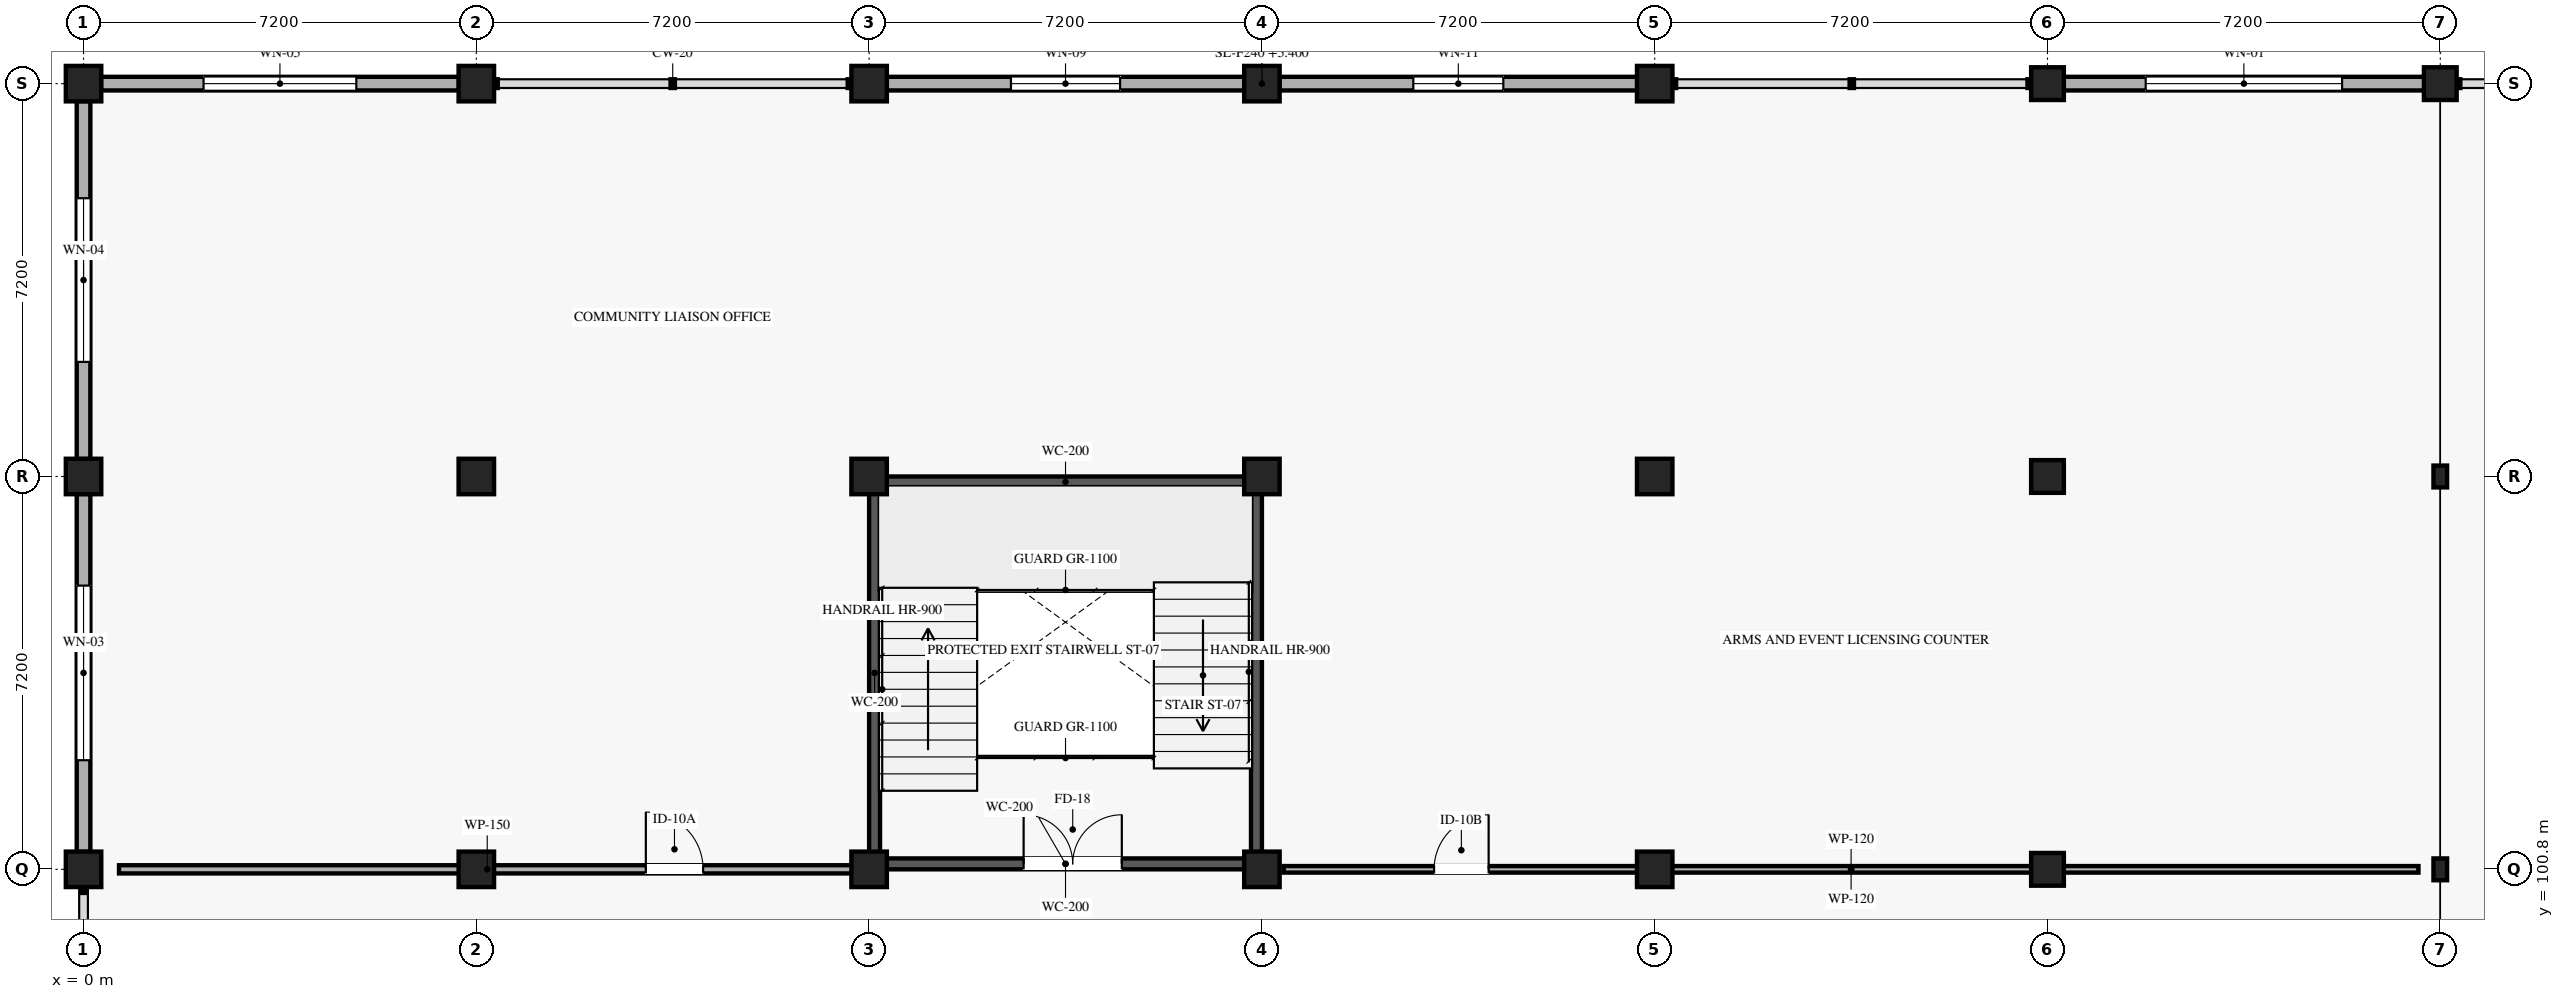
"""IFC4 building model, lengths in metres.
Left out: names, types, materials, properties, quantities, classifications, styles, units other than length and angle.
Written with IfcOpenShell. Run it as: python <this file> out.ifc"""

import sys

from ifc_helpers import new_model, si_unit, direction, frame, frame_2d, origin, origin_2d, place, context, subcontext, project, spatial, rectangle, i_section, extrude, element, fill, save


model = new_model("IFC4")
c1 = context("Model", 3, precision=1e-05, world=origin(), true_north=direction((0.0, 1.0)))
c2 = subcontext(c1, "Body", "Model", "MODEL_VIEW")
j1 = project(units=[si_unit("LENGTHUNIT", "METRE"), si_unit("PLANEANGLEUNIT", "RADIAN")], contexts=[c1])
p1 = place(None, origin())
s1 = spatial("IfcSite", under=j1, at=p1, CompositionType="ELEMENT")
p2 = place(p1, origin())
s2 = spatial("IfcBuilding", under=s1, at=p2, CompositionType="ELEMENT")
p3 = place(p2, frame((0.0, 0.0, 5.4)))
s3 = spatial("IfcBuildingStorey", under=s2, at=p3, CompositionType="ELEMENT", Elevation=5.4)
for number, where, z_axis, x_axis in (
    (1, (0.0, 100.8, 0.0), (0.0, 0.0, 1.0), (1.0, 0.0, 0.0)),
    (2, (0.0, 108.0, 0.0), (0.0, 0.0, 1.0), (1.0, 0.0, 0.0)),
    (3, (0.0, 115.2, 0.0), (0.0, 0.0, 1.0), (1.0, 0.0, 0.0)),
    (4, (7.2, 100.8, 0.0), (0.0, 0.0, 1.0), (1.0, 0.0, 0.0)),
    (5, (7.2, 108.0, 0.0), (0.0, 0.0, 1.0), (1.0, 0.0, 0.0)),
    (6, (7.2, 115.2, 0.0), (0.0, 0.0, 1.0), (1.0, 0.0, 0.0)),
    (7, (14.4, 100.8, 0.0), (0.0, 0.0, 1.0), (1.0, 0.0, 0.0)),
    (8, (14.4, 108.0, 0.0), (0.0, 0.0, 1.0), (1.0, 0.0, 0.0)),
    (9, (14.4, 115.2, 0.0), (0.0, 0.0, 1.0), (1.0, 0.0, 0.0)),
    (10, (21.6, 100.8, 0.0), (0.0, 0.0, 1.0), (1.0, 0.0, 0.0)),
    (11, (21.6, 108.0, 0.0), (0.0, 0.0, 1.0), (1.0, 0.0, 0.0)),
    (12, (21.6, 115.2, 0.0), (0.0, 0.0, 1.0), (1.0, 0.0, 0.0)),
    (13, (28.8, 100.8, 0.0), (0.0, 0.0, 1.0), (1.0, 0.0, 0.0)),
    (14, (28.8, 108.0, 0.0), (0.0, 0.0, 1.0), (1.0, 0.0, 0.0)),
    (15, (28.8, 115.2, 0.0), (0.0, 0.0, 1.0), (1.0, 0.0, 0.0)),
):
    element("IfcColumn", number, at=place(p3, frame(where, z_axis=z_axis, x_axis=x_axis)), inside=s3, PredefinedType="COLUMN", context=c2, shape_type="SweptSolid", body=[
        extrude(rectangle(XDim=0.65, YDim=0.65, at=origin_2d()), origin(), (0.0, 0.0, 1.0), 4.05),
    ])
for number, where, z_axis, x_axis in (
    (16, (36.0, 100.8, 0.0), (0.0, 0.0, 1.0), (1.0, 0.0, 0.0)),
    (17, (36.0, 108.0, 0.0), (0.0, 0.0, 1.0), (1.0, 0.0, 0.0)),
    (18, (36.0, 115.2, 0.0), (0.0, 0.0, 1.0), (1.0, 0.0, 0.0)),
):
    element("IfcColumn", number, at=place(p3, frame(where, z_axis=z_axis, x_axis=x_axis)), inside=s3, PredefinedType="COLUMN", context=c2, shape_type="SweptSolid", body=[
        extrude(rectangle(XDim=0.6, YDim=0.6, at=origin_2d()), origin(), (0.0, 0.0, 1.0), 4.05),
    ])
for number, where, z_axis, x_axis in (
    (19, (43.2, 100.8, 0.0), (0.0, 0.0, 1.0), (1.0, 0.0, 0.0)),
    (20, (43.2, 108.0, 0.0), (0.0, 0.0, 1.0), (1.0, 0.0, 0.0)),
):
    element("IfcColumn", number, at=place(p3, frame(where, z_axis=z_axis, x_axis=x_axis)), inside=s3, PredefinedType="COLUMN", context=c2, shape_type="SweptSolid", body=[
        extrude(i_section(OverallWidth=0.25, OverallDepth=0.4, WebThickness=0.01, FlangeThickness=0.013, at=origin_2d()), origin(), (0.0, 0.0, 1.0), 4.05),
    ])
p4 = place(p3, frame((43.2, 115.2, 0.0), z_axis=(0.0, 0.0, 1.0), x_axis=(1.0, 0.0, 0.0)))
e21 = element("IfcColumn", 21, at=p4, inside=s3, PredefinedType="COLUMN", context=c2, shape_type="SweptSolid", body=[
    extrude(rectangle(XDim=0.6, YDim=0.6, at=origin_2d()), origin(), (0.0, 0.0, 1.0), 4.05),
])
p5 = place(p3, frame((0.32, 115.2, 0.0), z_axis=(0.0, 0.0, 1.0), x_axis=(1.0, 0.0, 0.0)))
e22 = element("IfcWall", 22, at=p5, inside=s3, PredefinedType="SOLIDWALL", context=c2, shape_type="SweptSolid", body=[
    extrude(rectangle(XDim=6.56, YDim=0.25, at=frame_2d((3.28, 0.0))), origin(), (0.0, 0.0, 1.0), 3.195),
])
p6 = place(p5, frame((1.88, 0.0, 0.85)))
e23 = element("IfcOpeningElement", 23, at=p6, cuts=e22, PredefinedType="OPENING", context=c2, shape_type="SweptSolid", body=[
    extrude(rectangle(XDim=2.8, YDim=1.85, at=frame_2d((1.4, 0.925))), frame((0.0, 0.135, 0.0), z_axis=(0.0, -1.0, 0.0), x_axis=(1.0, 0.0, 0.0)), (0.0, 0.0, 1.0), 0.27),
])
p7 = place(p3, frame((14.72, 115.2, 0.0), z_axis=(0.0, 0.0, 1.0), x_axis=(1.0, 0.0, 0.0)))
e24 = element("IfcWall", 24, at=p7, inside=s3, PredefinedType="SOLIDWALL", context=c2, shape_type="SweptSolid", body=[
    extrude(rectangle(XDim=6.56, YDim=0.25, at=frame_2d((3.28, 0.0))), origin(), (0.0, 0.0, 1.0), 3.195),
])
p8 = place(p7, frame((2.28, 0.0, 0.85)))
e25 = element("IfcOpeningElement", 25, at=p8, cuts=e24, PredefinedType="OPENING", context=c2, shape_type="SweptSolid", body=[
    extrude(rectangle(XDim=2.0, YDim=1.65, at=frame_2d((1.0, 0.825))), frame((0.0, 0.135, 0.0), z_axis=(0.0, -1.0, 0.0), x_axis=(1.0, 0.0, 0.0)), (0.0, 0.0, 1.0), 0.27),
])
p9 = place(p3, frame((21.92, 115.2, 0.0), z_axis=(0.0, 0.0, 1.0), x_axis=(1.0, 0.0, 0.0)))
e26 = element("IfcWall", 26, at=p9, inside=s3, PredefinedType="SOLIDWALL", context=c2, shape_type="SweptSolid", body=[
    extrude(rectangle(XDim=6.56, YDim=0.25, at=frame_2d((3.28, 0.0))), origin(), (0.0, 0.0, 1.0), 3.195),
])
p10 = place(p9, frame((2.455, 0.0, 0.85)))
e27 = element("IfcOpeningElement", 27, at=p10, cuts=e26, PredefinedType="OPENING", context=c2, shape_type="SweptSolid", body=[
    extrude(rectangle(XDim=1.65, YDim=1.55, at=frame_2d((0.825, 0.775))), frame((0.0, 0.135, 0.0), z_axis=(0.0, -1.0, 0.0), x_axis=(1.0, 0.0, 0.0)), (0.0, 0.0, 1.0), 0.27),
])
p11 = place(p3, frame((36.295, 115.2, 0.0), z_axis=(0.0, 0.0, 1.0), x_axis=(1.0, 0.0, 0.0)))
e28 = element("IfcWall", 28, at=p11, inside=s3, PredefinedType="SOLIDWALL", context=c2, shape_type="SweptSolid", body=[
    extrude(rectangle(XDim=6.61, YDim=0.25, at=frame_2d((3.305, 0.0))), origin(), (0.0, 0.0, 1.0), 3.195),
])
p12 = place(p11, frame((1.505, 0.0, 0.85)))
e29 = element("IfcOpeningElement", 29, at=p12, cuts=e28, PredefinedType="OPENING", context=c2, shape_type="SweptSolid", body=[
    extrude(rectangle(XDim=3.6, YDim=2.05, at=frame_2d((1.8, 1.025))), frame((0.0, 0.135, 0.0), z_axis=(0.0, -1.0, 0.0), x_axis=(1.0, 0.0, 0.0)), (0.0, 0.0, 1.0), 0.27),
])
p13 = place(p3, frame((0.0, 101.12, 0.0), z_axis=(0.0, 0.0, 1.0), x_axis=(0.0, 1.0, 0.0)))
e30 = element("IfcWall", 30, at=p13, inside=s3, PredefinedType="SOLIDWALL", context=c2, shape_type="SweptSolid", body=[
    extrude(rectangle(XDim=6.56, YDim=0.25, at=frame_2d((3.28, 0.0))), origin(), (0.0, 0.0, 1.0), 3.195),
])
p14 = place(p13, frame((1.68, 0.0, 0.85)))
e31 = element("IfcOpeningElement", 31, at=p14, cuts=e30, PredefinedType="OPENING", context=c2, shape_type="SweptSolid", body=[
    extrude(rectangle(XDim=3.2, YDim=1.95, at=frame_2d((1.6, 0.975))), frame((0.0, 0.135, 0.0), z_axis=(0.0, -1.0, 0.0), x_axis=(1.0, 0.0, 0.0)), (0.0, 0.0, 1.0), 0.27),
])
p15 = place(p3, frame((0.0, 108.32, 0.0), z_axis=(0.0, 0.0, 1.0), x_axis=(0.0, 1.0, 0.0)))
e32 = element("IfcWall", 32, at=p15, inside=s3, PredefinedType="SOLIDWALL", context=c2, shape_type="SweptSolid", body=[
    extrude(rectangle(XDim=6.56, YDim=0.25, at=frame_2d((3.28, 0.0))), origin(), (0.0, 0.0, 1.0), 3.195),
])
p16 = place(p15, frame((1.78, 0.0, 0.85)))
e33 = element("IfcOpeningElement", 33, at=p16, cuts=e32, PredefinedType="OPENING", context=c2, shape_type="SweptSolid", body=[
    extrude(rectangle(XDim=3.0, YDim=1.9, at=frame_2d((1.5, 0.95))), frame((0.0, 0.135, 0.0), z_axis=(0.0, -1.0, 0.0), x_axis=(1.0, 0.0, 0.0)), (0.0, 0.0, 1.0), 0.27),
])
p17 = place(p3, frame((14.6, 100.9, 0.0), z_axis=(0.0, 0.0, 1.0), x_axis=(1.0, 0.0, 0.0)))
e34 = element("IfcWall", 34, at=p17, inside=s3, PredefinedType="SHEAR", context=c2, shape_type="SweptSolid", body=[
    extrude(rectangle(XDim=6.8, YDim=0.2, at=frame_2d((3.4, 0.0))), origin(), (0.0, 0.0, 1.0), 3.81),
])
p18 = place(p17, frame((2.632, 0.0, 0.0)))
e35 = element("IfcOpeningElement", 35, at=p18, cuts=e34, PredefinedType="OPENING", context=c2, shape_type="SweptSolid", body=[
    extrude(rectangle(XDim=1.8, YDim=2.2, at=frame_2d((0.9, 1.1))), frame((0.0, 0.11, 0.0), z_axis=(0.0, -1.0, 0.0), x_axis=(1.0, 0.0, 0.0)), (0.0, 0.0, 1.0), 0.22),
])
p19 = place(p3, frame((14.6, 107.9, 0.0), z_axis=(0.0, 0.0, 1.0), x_axis=(1.0, 0.0, 0.0)))
e36 = element("IfcWall", 36, at=p19, inside=s3, PredefinedType="SHEAR", context=c2, shape_type="SweptSolid", body=[
    extrude(rectangle(XDim=6.8, YDim=0.2, at=frame_2d((3.4, 0.0))), origin(), (0.0, 0.0, 1.0), 3.81),
])
for number, where, z_axis, x_axis in (
    (37, (14.5, 101.0, 0.0), (0.0, 0.0, 1.0), (0.0, 1.0, 0.0)),
    (38, (21.5, 101.0, 0.0), (0.0, 0.0, 1.0), (0.0, 1.0, 0.0)),
):
    element("IfcWall", number, at=place(p3, frame(where, z_axis=z_axis, x_axis=x_axis)), inside=s3, PredefinedType="SHEAR", context=c2, shape_type="SweptSolid", body=[
        extrude(rectangle(XDim=6.8, YDim=0.2, at=frame_2d((3.4, 0.0))), origin(), (0.0, 0.0, 1.0), 3.81),
    ])
p20 = place(p3, frame((0.65, 100.8, 0.0), z_axis=(0.0, 0.0, 1.0), x_axis=(1.0, 0.0, 0.0)))
e39 = element("IfcWall", 39, at=p20, inside=s3, PredefinedType="PARTITIONING", context=c2, shape_type="SweptSolid", body=[
    extrude(rectangle(XDim=13.5, YDim=0.15, at=frame_2d((6.75, 0.0))), origin(), (0.0, 0.0, 1.0), 3.2),
])
p21 = place(p20, frame((9.657, 0.0, 0.0)))
e40 = element("IfcOpeningElement", 40, at=p21, cuts=e39, PredefinedType="OPENING", context=c2, shape_type="SweptSolid", body=[
    extrude(rectangle(XDim=1.05, YDim=2.15, at=frame_2d((0.525, 1.075))), frame((0.0, 0.085, 0.0), z_axis=(0.0, -1.0, 0.0), x_axis=(1.0, 0.0, 0.0)), (0.0, 0.0, 1.0), 0.17),
])
p22 = place(p3, frame((22.0, 100.8, 0.0), z_axis=(0.0, 0.0, 1.0), x_axis=(1.0, 0.0, 0.0)))
e41 = element("IfcWall", 41, at=p22, inside=s3, PredefinedType="PARTITIONING", context=c2, shape_type="SweptSolid", body=[
    extrude(rectangle(XDim=20.8, YDim=0.12, at=frame_2d((10.4, 0.0))), origin(), (0.0, 0.0, 1.0), 3.2),
])
p23 = place(p22, frame((2.756, 0.0, 0.0)))
e42 = element("IfcOpeningElement", 42, at=p23, cuts=e41, PredefinedType="OPENING", context=c2, shape_type="SweptSolid", body=[
    extrude(rectangle(XDim=1.0, YDim=2.1, at=frame_2d((0.5, 1.05))), frame((0.0, 0.07, 0.0), z_axis=(0.0, -1.0, 0.0), x_axis=(1.0, 0.0, 0.0)), (0.0, 0.0, 1.0), 0.14),
])
p24 = place(p6, origin())
e43 = element("IfcWindow", 43, at=p24, inside=s3, PartitioningType="SINGLE_PANEL", PredefinedType="WINDOW", context=c2, shape_type="SweptSolid", body=[
    extrude(rectangle(XDim=2.8, YDim=1.85, at=frame_2d((1.4, 0.925))), frame((0.0, 0.03, 0.0), z_axis=(0.0, -1.0, 0.0), x_axis=(1.0, 0.0, 0.0)), (0.0, 0.0, 1.0), 0.06),
])
fill(e23, e43)
p25 = place(p8, origin())
e44 = element("IfcWindow", 44, at=p25, inside=s3, PartitioningType="SINGLE_PANEL", PredefinedType="WINDOW", context=c2, shape_type="SweptSolid", body=[
    extrude(rectangle(XDim=2.0, YDim=1.65, at=frame_2d((1.0, 0.825))), frame((0.0, 0.03, 0.0), z_axis=(0.0, -1.0, 0.0), x_axis=(1.0, 0.0, 0.0)), (0.0, 0.0, 1.0), 0.06),
])
fill(e25, e44)
p26 = place(p10, origin())
e45 = element("IfcWindow", 45, at=p26, inside=s3, PartitioningType="SINGLE_PANEL", PredefinedType="WINDOW", context=c2, shape_type="SweptSolid", body=[
    extrude(rectangle(XDim=1.65, YDim=1.55, at=frame_2d((0.825, 0.775))), frame((0.0, 0.03, 0.0), z_axis=(0.0, -1.0, 0.0), x_axis=(1.0, 0.0, 0.0)), (0.0, 0.0, 1.0), 0.06),
])
fill(e27, e45)
p27 = place(p12, origin())
e46 = element("IfcWindow", 46, at=p27, inside=s3, PartitioningType="SINGLE_PANEL", PredefinedType="WINDOW", context=c2, shape_type="SweptSolid", body=[
    extrude(rectangle(XDim=3.6, YDim=2.05, at=frame_2d((1.8, 1.025))), frame((0.0, 0.03, 0.0), z_axis=(0.0, -1.0, 0.0), x_axis=(1.0, 0.0, 0.0)), (0.0, 0.0, 1.0), 0.06),
])
fill(e29, e46)
p28 = place(p14, origin())
e47 = element("IfcWindow", 47, at=p28, inside=s3, PartitioningType="SINGLE_PANEL", PredefinedType="WINDOW", context=c2, shape_type="SweptSolid", body=[
    extrude(rectangle(XDim=3.2, YDim=1.95, at=frame_2d((1.6, 0.975))), frame((0.0, 0.03, 0.0), z_axis=(0.0, -1.0, 0.0), x_axis=(1.0, 0.0, 0.0)), (0.0, 0.0, 1.0), 0.06),
])
fill(e31, e47)
p29 = place(p16, origin())
e48 = element("IfcWindow", 48, at=p29, inside=s3, PartitioningType="SINGLE_PANEL", PredefinedType="WINDOW", context=c2, shape_type="SweptSolid", body=[
    extrude(rectangle(XDim=3.0, YDim=1.9, at=frame_2d((1.5, 0.95))), frame((0.0, 0.03, 0.0), z_axis=(0.0, -1.0, 0.0), x_axis=(1.0, 0.0, 0.0)), (0.0, 0.0, 1.0), 0.06),
])
fill(e33, e48)
p30 = place(p18, origin())
e49 = element("IfcDoor", 49, at=p30, inside=s3, OperationType="DOUBLE_DOOR_SINGLE_SWING", PredefinedType="DOOR", context=c2, shape_type="SweptSolid", body=[
    extrude(rectangle(XDim=1.8, YDim=2.2, at=frame_2d((0.9, 1.1))), frame((0.0, 0.025, 0.0), z_axis=(0.0, -1.0, 0.0), x_axis=(1.0, 0.0, 0.0)), (0.0, 0.0, 1.0), 0.05),
])
fill(e35, e49)
p31 = place(p21, origin())
e50 = element("IfcDoor", 50, at=p31, inside=s3, OperationType="SINGLE_SWING_LEFT", PredefinedType="DOOR", context=c2, shape_type="SweptSolid", body=[
    extrude(rectangle(XDim=1.05, YDim=2.15, at=frame_2d((0.525, 1.075))), frame((0.0, 0.025, 0.0), z_axis=(0.0, -1.0, 0.0), x_axis=(1.0, 0.0, 0.0)), (0.0, 0.0, 1.0), 0.05),
])
fill(e40, e50)
p32 = place(p23, origin())
e51 = element("IfcDoor", 51, at=p32, inside=s3, OperationType="SINGLE_SWING_RIGHT", PredefinedType="DOOR", context=c2, shape_type="SweptSolid", body=[
    extrude(rectangle(XDim=1.0, YDim=2.1, at=frame_2d((0.5, 1.05))), frame((0.0, 0.025, 0.0), z_axis=(0.0, -1.0, 0.0), x_axis=(1.0, 0.0, 0.0)), (0.0, 0.0, 1.0), 0.05),
])
fill(e42, e51)
save(model, sys.argv[1])
